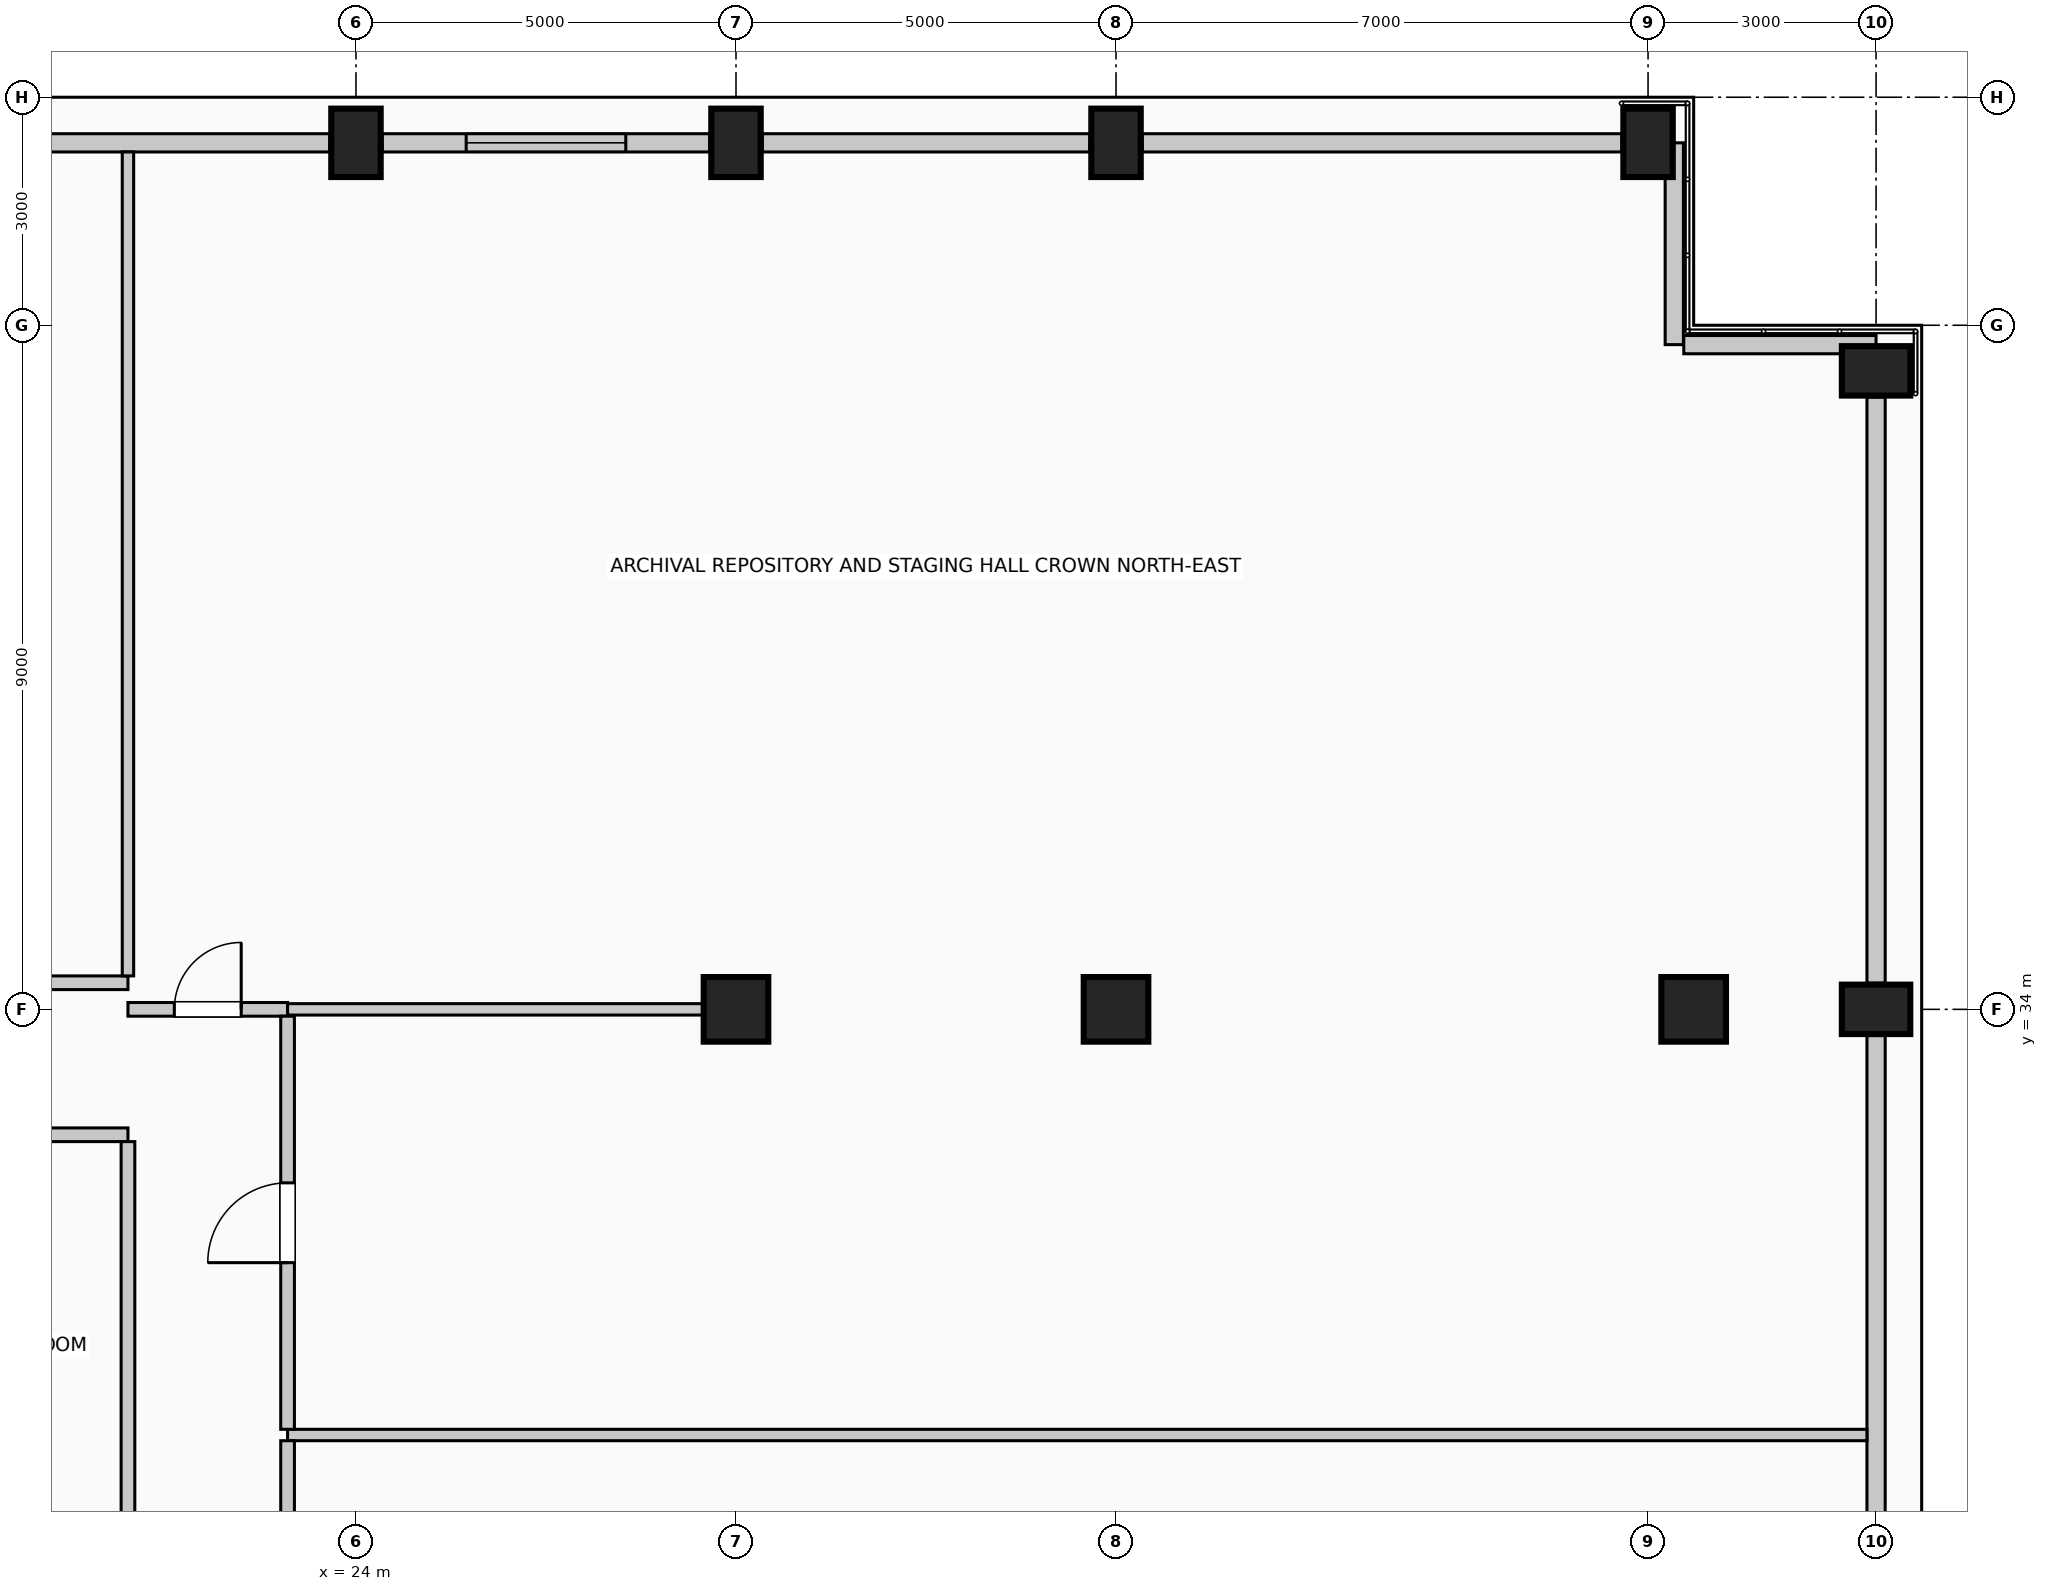
"""IFC4 building model, lengths in metres.
Left out: names, types, materials, properties, quantities, classifications, styles, units other than length and angle.
Written with IfcOpenShell. Run it as: python <this file> out.ifc"""

import sys

from ifc_helpers import new_model, si_unit, direction, frame, frame_2d, origin, origin_2d, place, context, subcontext, project, spatial, rectangle, circle, extrude, element, fill, save


model = new_model("IFC4")
c1 = context("Model", 3, precision=1e-05, world=origin(), true_north=direction((0.0, 1.0)))
c2 = subcontext(c1, "Body", "Model", "MODEL_VIEW")
j1 = project(units=[si_unit("LENGTHUNIT", "METRE"), si_unit("PLANEANGLEUNIT", "RADIAN")], contexts=[c1])
p1 = place(None, origin())
s1 = spatial("IfcSite", under=j1, at=p1, CompositionType="ELEMENT")
p2 = place(p1, origin())
s2 = spatial("IfcBuilding", under=s1, at=p2, CompositionType="ELEMENT")
p3 = place(p2, frame((0.0, 0.0, 293.0)))
s3 = spatial("IfcBuildingStorey", under=s2, at=p3, CompositionType="ELEMENT", Elevation=293.0)
for number, where, z_axis, x_axis in (
    (1, (24.0, 45.4, 0.0), (0.0, 0.0, 1.0), (1.0, 0.0, 0.0)),
    (2, (29.0, 45.4, 0.0), (0.0, 0.0, 1.0), (1.0, 0.0, 0.0)),
    (3, (34.0, 45.4, 0.0), (0.0, 0.0, 1.0), (1.0, 0.0, 0.0)),
    (4, (41.0, 45.4, 0.0), (0.0, 0.0, 1.0), (1.0, 0.0, 0.0)),
    (5, (44.0, 34.0, 0.0), (0.0, 0.0, 1.0), (0.0, 1.0, 0.0)),
    (6, (44.0, 42.4, 0.0), (0.0, 0.0, 1.0), (0.0, 1.0, 0.0)),
):
    element("IfcColumn", number, at=place(p3, frame(where, z_axis=z_axis, x_axis=x_axis)), inside=s3, PredefinedType="COLUMN", context=c2, shape_type="SweptSolid", body=[
        extrude(rectangle(XDim=0.65, YDim=0.9, at=origin_2d()), origin(), (0.0, 0.0, 1.0), 4.0),
    ])
for number, where, z_axis, x_axis in (
    (7, (29.0, 34.0, 0.0), (0.0, 0.0, 1.0), (1.0, 0.0, 0.0)),
    (8, (41.6, 34.0, 0.0), (0.0, 0.0, 1.0), (1.0, 0.0, 0.0)),
    (9, (34.0, 34.0, 0.0), (0.0, 0.0, 1.0), (1.0, 0.0, 0.0)),
):
    element("IfcColumn", number, at=place(p3, frame(where, z_axis=z_axis, x_axis=x_axis)), inside=s3, PredefinedType="COLUMN", context=c2, shape_type="SweptSolid", body=[
        extrude(circle(Radius=0.425, at=origin_2d()), origin(), (0.0, 0.0, 1.0), 4.0),
    ])
p4 = place(p3, frame((16.745, 45.4, 0.0), z_axis=(0.0, 0.0, 1.0), x_axis=(1.0, 0.0, 0.0)))
e10 = element("IfcWall", 10, at=p4, inside=s3, PredefinedType="SOLIDWALL", context=c2, shape_type="SweptSolid", body=[
    extrude(rectangle(XDim=6.91, YDim=0.24, at=frame_2d((3.455, 0.0))), origin(), (0.0, 0.0, 1.0), 3.025),
])
p5 = place(p4, frame((0.903, 0.0, 0.35)))
e11 = element("IfcOpeningElement", 11, at=p5, cuts=e10, PredefinedType="OPENING", context=c2, shape_type="SweptSolid", body=[
    extrude(rectangle(XDim=2.1, YDim=2.2, at=frame_2d((1.05, 1.1))), frame((0.0, 0.13, 0.0), z_axis=(0.0, -1.0, 0.0), x_axis=(1.0, 0.0, 0.0)), (0.0, 0.0, 1.0), 0.26),
])
p6 = place(p3, frame((24.345, 45.4, 0.0), z_axis=(0.0, 0.0, 1.0), x_axis=(1.0, 0.0, 0.0)))
e12 = element("IfcWall", 12, at=p6, inside=s3, PredefinedType="SOLIDWALL", context=c2, shape_type="SweptSolid", body=[
    extrude(rectangle(XDim=4.31, YDim=0.24, at=frame_2d((2.155, 0.0))), origin(), (0.0, 0.0, 1.0), 3.025),
])
p7 = place(p6, frame((1.105, 0.0, 0.35)))
e13 = element("IfcOpeningElement", 13, at=p7, cuts=e12, PredefinedType="OPENING", context=c2, shape_type="SweptSolid", body=[
    extrude(rectangle(XDim=2.1, YDim=2.2, at=frame_2d((1.05, 1.1))), frame((0.0, 0.13, 0.0), z_axis=(0.0, -1.0, 0.0), x_axis=(1.0, 0.0, 0.0)), (0.0, 0.0, 1.0), 0.26),
])
p8 = place(p3, frame((29.345, 45.4, 0.0), z_axis=(0.0, 0.0, 1.0), x_axis=(1.0, 0.0, 0.0)))
e14 = element("IfcWall", 14, at=p8, inside=s3, PredefinedType="SOLIDWALL", context=c2, shape_type="SweptSolid", body=[
    extrude(rectangle(XDim=4.31, YDim=0.24, at=frame_2d((2.155, 0.0))), origin(), (0.0, 0.0, 1.0), 2.175),
])
p9 = place(p3, frame((34.345, 45.4, 0.0), z_axis=(0.0, 0.0, 1.0), x_axis=(1.0, 0.0, 0.0)))
e15 = element("IfcWall", 15, at=p9, inside=s3, PredefinedType="SOLIDWALL", context=c2, shape_type="SweptSolid", body=[
    extrude(rectangle(XDim=6.31, YDim=0.24, at=frame_2d((3.155, 0.0))), origin(), (0.0, 0.0, 1.0), 2.175),
])
p10 = place(p3, frame((44.0, 33.655, 0.0), z_axis=(0.0, 0.0, 1.0), x_axis=(0.0, -1.0, 0.0)))
e16 = element("IfcWall", 16, at=p10, inside=s3, PredefinedType="SOLIDWALL", context=c2, shape_type="SweptSolid", body=[
    extrude(rectangle(XDim=15.31, YDim=0.24, at=frame_2d((7.655, 0.0))), origin(), (0.0, 0.0, 1.0), 3.015),
])
p11 = place(p10, frame((9.507, 0.0, 0.35)))
e17 = element("IfcOpeningElement", 17, at=p11, cuts=e16, PredefinedType="OPENING", context=c2, shape_type="SweptSolid", body=[
    extrude(rectangle(XDim=2.1, YDim=2.2, at=frame_2d((1.05, 1.1))), frame((0.0, 0.13, 0.0), z_axis=(0.0, -1.0, 0.0), x_axis=(1.0, 0.0, 0.0)), (0.0, 0.0, 1.0), 0.26),
])
p12 = place(p3, frame((44.0, 42.055, 0.0), z_axis=(0.0, 0.0, 1.0), x_axis=(0.0, -1.0, 0.0)))
e18 = element("IfcWall", 18, at=p12, inside=s3, PredefinedType="SOLIDWALL", context=c2, shape_type="SweptSolid", body=[
    extrude(rectangle(XDim=7.71, YDim=0.24, at=frame_2d((3.855, 0.0))), origin(), (0.0, 0.0, 1.0), 3.015),
])
p13 = place(p3, frame((41.345, 45.4, 0.0), z_axis=(0.0, 0.0, 1.0), x_axis=(0.0, -1.0, 0.0)))
e19 = element("IfcWall", 19, at=p13, inside=s3, PredefinedType="SOLIDWALL", context=c2, shape_type="SweptSolid", body=[
    extrude(rectangle(XDim=2.655, YDim=0.24, at=frame_2d((1.327, 0.0))), origin(), (0.0, 0.0, 1.0), 2.165),
])
p14 = place(p3, frame((41.47, 42.745, 0.0), z_axis=(0.0, 0.0, 1.0), x_axis=(1.0, 0.0, 0.0)))
e20 = element("IfcWall", 20, at=p14, inside=s3, PredefinedType="SOLIDWALL", context=c2, shape_type="SweptSolid", body=[
    extrude(rectangle(XDim=2.53, YDim=0.24, at=frame_2d((1.265, 0.0))), origin(), (0.0, 0.0, 1.0), 2.165),
])
p15 = place(p3, frame((23.1, 28.4, 0.0), z_axis=(0.0, 0.0, 1.0), x_axis=(1.0, 0.0, 0.0)))
e21 = element("IfcWall", 21, at=p15, inside=s3, PredefinedType="PARTITIONING", context=c2, shape_type="SweptSolid", body=[
    extrude(rectangle(XDim=20.78, YDim=0.15, at=frame_2d((10.39, 0.0))), origin(), (0.0, 0.0, 1.0), 3.775),
])
p16 = place(p3, frame((15.85, 32.35, 0.0), z_axis=(0.0, 0.0, 1.0), x_axis=(1.0, 0.0, 0.0)))
e22 = element("IfcWall", 22, at=p16, inside=s3, PredefinedType="PARTITIONING", context=c2, shape_type="SweptSolid", body=[
    extrude(rectangle(XDim=5.15, YDim=0.18, at=frame_2d((2.575, 0.0))), origin(), (0.0, 0.0, 1.0), 3.775),
])
p17 = place(p3, frame((21.0, 34.0, 0.0), z_axis=(0.0, 0.0, 1.0), x_axis=(1.0, 0.0, 0.0)))
e23 = element("IfcWall", 23, at=p17, inside=s3, PredefinedType="PARTITIONING", context=c2, shape_type="SweptSolid", body=[
    extrude(rectangle(XDim=2.1, YDim=0.18, at=frame_2d((1.05, 0.0))), origin(), (0.0, 0.0, 1.0), 3.27),
])
p18 = place(p17, frame((0.61, 0.0, 0.0)))
e24 = element("IfcOpeningElement", 24, at=p18, cuts=e23, PredefinedType="OPENING", context=c2, shape_type="SweptSolid", body=[
    extrude(rectangle(XDim=0.88, YDim=2.1, at=frame_2d((0.44, 1.05))), frame((0.0, 0.1, 0.0), z_axis=(0.0, -1.0, 0.0), x_axis=(1.0, 0.0, 0.0)), (0.0, 0.0, 1.0), 0.2),
])
p19 = place(p3, frame((23.1, 34.0, 0.0), z_axis=(0.0, 0.0, 1.0), x_axis=(1.0, 0.0, 0.0)))
e25 = element("IfcWall", 25, at=p19, inside=s3, PredefinedType="PARTITIONING", context=c2, shape_type="SweptSolid", body=[
    extrude(rectangle(XDim=5.475, YDim=0.15, at=frame_2d((2.737, 0.0))), origin(), (0.0, 0.0, 1.0), 3.27),
])
p20 = place(p3, frame((17.0, 34.35, 0.0), z_axis=(0.0, 0.0, 1.0), x_axis=(1.0, 0.0, 0.0)))
e26 = element("IfcWall", 26, at=p20, inside=s3, PredefinedType="PARTITIONING", context=c2, shape_type="SweptSolid", body=[
    extrude(rectangle(XDim=4.0, YDim=0.18, at=frame_2d((2.0, 0.0))), origin(), (0.0, 0.0, 1.0), 3.775),
])
p21 = place(p20, frame((1.475, 0.0, 0.0)))
e27 = element("IfcOpeningElement", 27, at=p21, cuts=e26, PredefinedType="OPENING", context=c2, shape_type="SweptSolid", body=[
    extrude(rectangle(XDim=1.05, YDim=2.15, at=frame_2d((0.525, 1.075))), frame((0.0, 0.1, 0.0), z_axis=(0.0, -1.0, 0.0), x_axis=(1.0, 0.0, 0.0)), (0.0, 0.0, 1.0), 0.2),
])
p22 = place(p3, frame((21.0, 26.925, 0.0), z_axis=(0.0, 0.0, 1.0), x_axis=(0.0, 1.0, 0.0)))
e28 = element("IfcWall", 28, at=p22, inside=s3, PredefinedType="PARTITIONING", context=c2, shape_type="SweptSolid", body=[
    extrude(rectangle(XDim=5.335, YDim=0.18, at=frame_2d((2.667, 0.0))), origin(), (0.0, 0.0, 1.0), 3.775),
])
p23 = place(p3, frame((21.0, 34.44, 0.0), z_axis=(0.0, 0.0, 1.0), x_axis=(0.0, 1.0, 0.0)))
e29 = element("IfcWall", 29, at=p23, inside=s3, PredefinedType="PARTITIONING", context=c2, shape_type="SweptSolid", body=[
    extrude(rectangle(XDim=10.84, YDim=0.15, at=frame_2d((5.42, 0.0))), origin(), (0.0, 0.0, 1.0), 3.775),
])
p24 = place(p3, frame((23.1, 17.3, 0.0), z_axis=(0.0, 0.0, 1.0), x_axis=(0.0, 1.0, 0.0)))
e30 = element("IfcWall", 30, at=p24, inside=s3, PredefinedType="PARTITIONING", context=c2, shape_type="SweptSolid", body=[
    extrude(rectangle(XDim=11.025, YDim=0.18, at=frame_2d((5.512, 0.0))), origin(), (0.0, 0.0, 1.0), 3.775),
])
p25 = place(p24, frame((5.038, 0.0, 0.0)))
e31 = element("IfcOpeningElement", 31, at=p25, cuts=e30, PredefinedType="OPENING", context=c2, shape_type="SweptSolid", body=[
    extrude(rectangle(XDim=0.95, YDim=2.15, at=frame_2d((0.475, 1.075))), frame((0.0, 0.1, 0.0), z_axis=(0.0, -1.0, 0.0), x_axis=(1.0, 0.0, 0.0)), (0.0, 0.0, 1.0), 0.2),
])
p26 = place(p3, frame((23.1, 28.475, 0.0), z_axis=(0.0, 0.0, 1.0), x_axis=(0.0, 1.0, 0.0)))
e32 = element("IfcWall", 32, at=p26, inside=s3, PredefinedType="PARTITIONING", context=c2, shape_type="SweptSolid", body=[
    extrude(rectangle(XDim=5.435, YDim=0.18, at=frame_2d((2.717, 0.0))), origin(), (0.0, 0.0, 1.0), 3.775),
])
p27 = place(p26, frame((2.192, 0.0, 0.0)))
e33 = element("IfcOpeningElement", 33, at=p27, cuts=e32, PredefinedType="OPENING", context=c2, shape_type="SweptSolid", body=[
    extrude(rectangle(XDim=1.05, YDim=2.15, at=frame_2d((0.525, 1.075))), frame((0.0, 0.1, 0.0), z_axis=(0.0, -1.0, 0.0), x_axis=(1.0, 0.0, 0.0)), (0.0, 0.0, 1.0), 0.2),
])
p28 = place(p7, origin())
e34 = element("IfcWindow", 34, at=p28, inside=s3, PartitioningType="SINGLE_PANEL", PredefinedType="WINDOW", context=c2, shape_type="SweptSolid", body=[
    extrude(rectangle(XDim=2.1, YDim=2.2, at=frame_2d((1.05, 1.1))), frame((0.0, 0.03, 0.0), z_axis=(0.0, -1.0, 0.0), x_axis=(1.0, 0.0, 0.0)), (0.0, 0.0, 1.0), 0.06),
])
fill(e13, e34)
p29 = place(p18, origin())
e35 = element("IfcDoor", 35, at=p29, inside=s3, OperationType="SINGLE_SWING_RIGHT", PredefinedType="DOOR", context=c2, shape_type="SweptSolid", body=[
    extrude(rectangle(XDim=0.88, YDim=2.1, at=frame_2d((0.44, 1.05))), frame((0.0, 0.025, 0.0), z_axis=(0.0, -1.0, 0.0), x_axis=(1.0, 0.0, 0.0)), (0.0, 0.0, 1.0), 0.05),
])
fill(e24, e35)
p30 = place(p27, origin())
e36 = element("IfcDoor", 36, at=p30, inside=s3, OperationType="SINGLE_SWING_LEFT", PredefinedType="DOOR", context=c2, shape_type="SweptSolid", body=[
    extrude(rectangle(XDim=1.05, YDim=2.15, at=frame_2d((0.525, 1.075))), frame((0.0, 0.025, 0.0), z_axis=(0.0, -1.0, 0.0), x_axis=(1.0, 0.0, 0.0)), (0.0, 0.0, 1.0), 0.05),
])
fill(e33, e36)
save(model, sys.argv[1])
